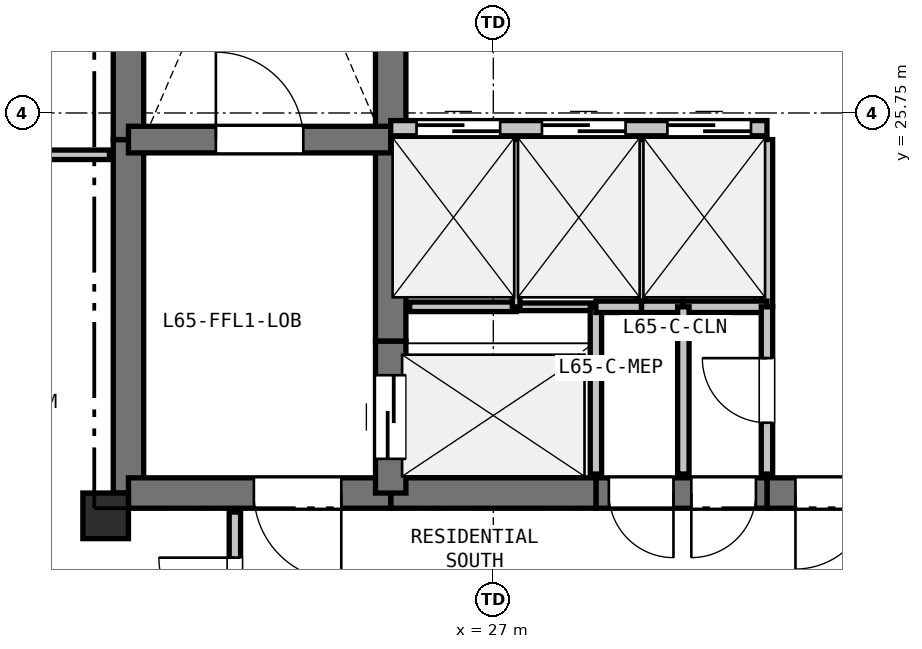
"""IFC4 building model, lengths in metres.
Left out: names, types, materials, properties, quantities, classifications, styles, units other than length and angle.
Written with IfcOpenShell. Run it as: python <this file> out.ifc"""

import sys

from ifc_helpers import new_model, si_unit, direction, frame, frame_2d, origin, origin_2d, place, context, subcontext, project, spatial, rectangle, extrude, element, fill, save


model = new_model("IFC4")
c1 = context("Model", 3, precision=1e-05, world=origin(), true_north=direction((0.0, 1.0)))
c2 = subcontext(c1, "Body", "Model", "MODEL_VIEW")
j1 = project(units=[si_unit("LENGTHUNIT", "METRE"), si_unit("PLANEANGLEUNIT", "RADIAN")], contexts=[c1])
p1 = place(None, origin())
s1 = spatial("IfcSite", under=j1, at=p1, CompositionType="ELEMENT")
p2 = place(p1, origin())
s2 = spatial("IfcBuilding", under=s1, at=p2, CompositionType="ELEMENT")
p3 = place(p2, frame((0.0, 0.0, 233.1)))
s3 = spatial("IfcBuildingStorey", under=s2, at=p3, CompositionType="ELEMENT", Elevation=233.1)
p4 = place(p3, frame((21.9, 20.45, 0.0), z_axis=(0.0, 0.0, 1.0), x_axis=(1.0, 0.0, 0.0)))
e1 = element("IfcColumn", 1, at=p4, inside=s3, PredefinedType="COLUMN", context=c2, shape_type="SweptSolid", body=[
    extrude(rectangle(XDim=0.6, YDim=0.6, at=origin_2d()), origin(), (0.0, 0.0, 1.0), 3.3),
])
p5 = place(p3, frame((22.2, 20.75, 0.0), z_axis=(0.0, 0.0, 1.0), x_axis=(0.0, 1.0, 0.0)))
e2 = element("IfcWall", 2, at=p5, inside=s3, PredefinedType="SHEAR", context=c2, shape_type="SweptSolid", body=[
    extrude(rectangle(XDim=4.65, YDim=0.4, at=frame_2d((2.325, 0.0))), origin(), (0.0, 0.0, 1.0), 3.08),
])
p6 = place(p3, frame((22.2, 25.4, 0.0), z_axis=(0.0, 0.0, 1.0), x_axis=(0.0, 1.0, 0.0)))
e3 = element("IfcWall", 3, at=p6, inside=s3, PredefinedType="SHEAR", context=c2, shape_type="SweptSolid", body=[
    extrude(rectangle(XDim=7.35, YDim=0.4, at=frame_2d((3.675, 0.0))), origin(), (0.0, 0.0, 1.0), 3.08),
])
p7 = place(p3, frame((32.35, 20.75, 0.0), z_axis=(0.0, 0.0, 1.0), x_axis=(-1.0, 0.0, 0.0)))
e4 = element("IfcWall", 4, at=p7, inside=s3, PredefinedType="SHEAR", context=c2, shape_type="SweptSolid", body=[
    extrude(rectangle(XDim=1.75, YDim=0.4, at=frame_2d((0.875, 0.0))), origin(), (0.0, 0.0, 1.0), 3.08),
])
p8 = place(p7, frame((0.375, 0.0, 0.0)))
e5 = element("IfcOpeningElement", 5, at=p8, cuts=e4, PredefinedType="OPENING", context=c2, shape_type="SweptSolid", body=[
    extrude(rectangle(XDim=1.0, YDim=2.15, at=frame_2d((0.5, 1.075))), frame((0.0, 0.21, 0.0), z_axis=(0.0, -1.0, 0.0), x_axis=(1.0, 0.0, 0.0)), (0.0, 0.0, 1.0), 0.42),
])
p9 = place(p3, frame((30.6, 20.75, 0.0), z_axis=(0.0, 0.0, 1.0), x_axis=(-1.0, 0.0, 0.0)))
e6 = element("IfcWall", 6, at=p9, inside=s3, PredefinedType="SHEAR", context=c2, shape_type="SweptSolid", body=[
    extrude(rectangle(XDim=2.25, YDim=0.4, at=frame_2d((1.125, 0.0))), origin(), (0.0, 0.0, 1.0), 3.08),
])
p10 = place(p9, frame((1.23, 0.0, 0.0)))
e7 = element("IfcOpeningElement", 7, at=p10, cuts=e6, PredefinedType="OPENING", context=c2, shape_type="SweptSolid", body=[
    extrude(rectangle(XDim=0.85, YDim=2.1, at=frame_2d((0.425, 1.05))), frame((0.0, 0.21, 0.0), z_axis=(0.0, -1.0, 0.0), x_axis=(1.0, 0.0, 0.0)), (0.0, 0.0, 1.0), 0.42),
])
p11 = place(p9, frame((0.145, 0.0, 0.0)))
e8 = element("IfcOpeningElement", 8, at=p11, cuts=e6, PredefinedType="OPENING", context=c2, shape_type="SweptSolid", body=[
    extrude(rectangle(XDim=0.85, YDim=2.1, at=frame_2d((0.425, 1.05))), frame((0.0, 0.21, 0.0), z_axis=(0.0, -1.0, 0.0), x_axis=(1.0, 0.0, 0.0)), (0.0, 0.0, 1.0), 0.42),
])
p12 = place(p3, frame((28.35, 20.75, 0.0), z_axis=(0.0, 0.0, 1.0), x_axis=(-1.0, 0.0, 0.0)))
e9 = element("IfcWall", 9, at=p12, inside=s3, PredefinedType="SHEAR", context=c2, shape_type="SweptSolid", body=[
    extrude(rectangle(XDim=2.7, YDim=0.4, at=frame_2d((1.35, 0.0))), origin(), (0.0, 0.0, 1.0), 3.08),
])
p13 = place(p3, frame((25.65, 20.75, 0.0), z_axis=(0.0, 0.0, 1.0), x_axis=(-1.0, 0.0, 0.0)))
e10 = element("IfcWall", 10, at=p13, inside=s3, PredefinedType="SHEAR", context=c2, shape_type="SweptSolid", body=[
    extrude(rectangle(XDim=3.45, YDim=0.4, at=frame_2d((1.725, 0.0))), origin(), (0.0, 0.0, 1.0), 3.08),
])
p14 = place(p13, frame((0.65, 0.0, 0.0)))
e11 = element("IfcOpeningElement", 11, at=p14, cuts=e10, PredefinedType="OPENING", context=c2, shape_type="SweptSolid", body=[
    extrude(rectangle(XDim=1.15, YDim=2.15, at=frame_2d((0.575, 1.075))), frame((0.0, 0.21, 0.0), z_axis=(0.0, -1.0, 0.0), x_axis=(1.0, 0.0, 0.0)), (0.0, 0.0, 1.0), 0.42),
])
p15 = place(p3, frame((25.65, 20.75, 0.0), z_axis=(0.0, 0.0, 1.0), x_axis=(0.0, 1.0, 0.0)))
e12 = element("IfcWall", 12, at=p15, inside=s3, PredefinedType="SHEAR", context=c2, shape_type="SweptSolid", body=[
    extrude(rectangle(XDim=2.0, YDim=0.4, at=frame_2d((1.0, 0.0))), origin(), (0.0, 0.0, 1.0), 3.08),
])
p16 = place(p15, frame((0.45, 0.0, 0.0)))
e13 = element("IfcOpeningElement", 13, at=p16, cuts=e12, PredefinedType="OPENING", context=c2, shape_type="SweptSolid", body=[
    extrude(rectangle(XDim=1.1, YDim=2.15, at=frame_2d((0.55, 1.075))), frame((0.0, 0.21, 0.0), z_axis=(0.0, -1.0, 0.0), x_axis=(1.0, 0.0, 0.0)), (0.0, 0.0, 1.0), 0.42),
])
p17 = place(p3, frame((25.65, 22.75, 0.0), z_axis=(0.0, 0.0, 1.0), x_axis=(0.0, 1.0, 0.0)))
e14 = element("IfcWall", 14, at=p17, inside=s3, PredefinedType="SHEAR", context=c2, shape_type="SweptSolid", body=[
    extrude(rectangle(XDim=2.8, YDim=0.4, at=frame_2d((1.4, 0.0))), origin(), (0.0, 0.0, 1.0), 3.08),
])
p18 = place(p3, frame((25.65, 25.55, 0.0), z_axis=(0.0, 0.0, 1.0), x_axis=(0.0, 1.0, 0.0)))
e15 = element("IfcWall", 15, at=p18, inside=s3, PredefinedType="SHEAR", context=c2, shape_type="SweptSolid", body=[
    extrude(rectangle(XDim=2.4, YDim=0.4, at=frame_2d((1.2, 0.0))), origin(), (0.0, 0.0, 1.0), 3.08),
])
p19 = place(p3, frame((22.2, 25.4, 0.0), z_axis=(0.0, 0.0, 1.0), x_axis=(1.0, 0.0, 0.0)))
e16 = element("IfcWall", 16, at=p19, inside=s3, PredefinedType="SHEAR", context=c2, shape_type="SweptSolid", body=[
    extrude(rectangle(XDim=3.45, YDim=0.35, at=frame_2d((1.725, 0.0))), origin(), (0.0, 0.0, 1.0), 3.08),
])
p20 = place(p19, frame((1.15, 0.0, 0.0)))
e17 = element("IfcOpeningElement", 17, at=p20, cuts=e16, PredefinedType="OPENING", context=c2, shape_type="SweptSolid", body=[
    extrude(rectangle(XDim=1.15, YDim=2.15, at=frame_2d((0.575, 1.075))), frame((0.0, 0.185, 0.0), z_axis=(0.0, -1.0, 0.0), x_axis=(1.0, 0.0, 0.0)), (0.0, 0.0, 1.0), 0.37),
])
p21 = place(p3, frame((25.65, 25.55, 0.0), z_axis=(0.0, 0.0, 1.0), x_axis=(1.0, 0.0, 0.0)))
e18 = element("IfcWall", 18, at=p21, inside=s3, PredefinedType="PARTITIONING", context=c2, shape_type="SweptSolid", body=[
    extrude(rectangle(XDim=4.95, YDim=0.2, at=frame_2d((2.475, 0.0))), origin(), (0.0, 0.0, 1.0), 3.08),
])
p22 = place(p21, frame((0.34, 0.0, 0.0)))
e19 = element("IfcOpeningElement", 19, at=p22, cuts=e18, PredefinedType="OPENING", context=c2, shape_type="SweptSolid", body=[
    extrude(rectangle(XDim=1.1, YDim=2.15, at=frame_2d((0.55, 1.075))), frame((0.0, 0.11, 0.0), z_axis=(0.0, -1.0, 0.0), x_axis=(1.0, 0.0, 0.0)), (0.0, 0.0, 1.0), 0.22),
])
p23 = place(p21, frame((1.99, 0.0, 0.0)))
e20 = element("IfcOpeningElement", 20, at=p23, cuts=e18, PredefinedType="OPENING", context=c2, shape_type="SweptSolid", body=[
    extrude(rectangle(XDim=1.1, YDim=2.15, at=frame_2d((0.55, 1.075))), frame((0.0, 0.11, 0.0), z_axis=(0.0, -1.0, 0.0), x_axis=(1.0, 0.0, 0.0)), (0.0, 0.0, 1.0), 0.22),
])
p24 = place(p21, frame((3.64, 0.0, 0.0)))
e21 = element("IfcOpeningElement", 21, at=p24, cuts=e18, PredefinedType="OPENING", context=c2, shape_type="SweptSolid", body=[
    extrude(rectangle(XDim=1.1, YDim=2.15, at=frame_2d((0.55, 1.075))), frame((0.0, 0.11, 0.0), z_axis=(0.0, -1.0, 0.0), x_axis=(1.0, 0.0, 0.0)), (0.0, 0.0, 1.0), 0.22),
])
p25 = place(p3, frame((25.9, 23.2, 0.0), z_axis=(0.0, 0.0, 1.0), x_axis=(1.0, 0.0, 0.0)))
e22 = element("IfcWall", 22, at=p25, inside=s3, PredefinedType="PARTITIONING", context=c2, shape_type="SweptSolid", body=[
    extrude(rectangle(XDim=1.4, YDim=0.125, at=frame_2d((0.7, 0.0))), origin(), (0.0, 0.0, 1.0), 3.08),
])
p26 = place(p3, frame((27.3, 23.2, 0.0), z_axis=(0.0, 0.0, 1.0), x_axis=(1.0, 0.0, 0.0)))
e23 = element("IfcWall", 23, at=p26, inside=s3, PredefinedType="PARTITIONING", context=c2, shape_type="SweptSolid", body=[
    extrude(rectangle(XDim=1.05, YDim=0.1, at=frame_2d((0.525, 0.0))), origin(), (0.0, 0.0, 1.0), 3.08),
])
p27 = place(p3, frame((28.35, 23.2, 0.0), z_axis=(0.0, 0.0, 1.0), x_axis=(0.0, -1.0, 0.0)))
e24 = element("IfcWall", 24, at=p27, inside=s3, PredefinedType="PARTITIONING", context=c2, shape_type="SweptSolid", body=[
    extrude(rectangle(XDim=2.2, YDim=0.15, at=frame_2d((1.1, 0.0))), origin(), (0.0, 0.0, 1.0), 3.08),
])
p28 = place(p3, frame((27.3, 25.4, 0.0), z_axis=(0.0, 0.0, 1.0), x_axis=(0.0, -1.0, 0.0)))
e25 = element("IfcWall", 25, at=p28, inside=s3, PredefinedType="PARTITIONING", context=c2, shape_type="SweptSolid", body=[
    extrude(rectangle(XDim=2.2, YDim=0.1, at=frame_2d((1.1, 0.0))), origin(), (0.0, 0.0, 1.0), 3.08),
])
p29 = place(p3, frame((28.95, 25.4, 0.0), z_axis=(0.0, 0.0, 1.0), x_axis=(0.0, -1.0, 0.0)))
e26 = element("IfcWall", 26, at=p29, inside=s3, PredefinedType="PARTITIONING", context=c2, shape_type="SweptSolid", body=[
    extrude(rectangle(XDim=2.2, YDim=0.125, at=frame_2d((1.1, 0.0))), origin(), (0.0, 0.0, 1.0), 3.08),
])
p30 = place(p3, frame((28.95, 23.2, 0.0), z_axis=(0.0, 0.0, 1.0), x_axis=(-1.0, 0.0, 0.0)))
e27 = element("IfcWall", 27, at=p30, inside=s3, PredefinedType="PARTITIONING", context=c2, shape_type="SweptSolid", body=[
    extrude(rectangle(XDim=0.6, YDim=0.15, at=frame_2d((0.3, 0.0))), origin(), (0.0, 0.0, 1.0), 3.08),
])
p31 = place(p3, frame((30.6, 25.4, 0.0), z_axis=(0.0, 0.0, 1.0), x_axis=(0.0, -1.0, 0.0)))
e28 = element("IfcWall", 28, at=p31, inside=s3, PredefinedType="PARTITIONING", context=c2, shape_type="SweptSolid", body=[
    extrude(rectangle(XDim=2.2, YDim=0.15, at=frame_2d((1.1, 0.0))), origin(), (0.0, 0.0, 1.0), 3.08),
])
p32 = place(p3, frame((30.6, 23.2, 0.0), z_axis=(0.0, 0.0, 1.0), x_axis=(-1.0, 0.0, 0.0)))
e29 = element("IfcWall", 29, at=p32, inside=s3, PredefinedType="PARTITIONING", context=c2, shape_type="SweptSolid", body=[
    extrude(rectangle(XDim=1.1, YDim=0.15, at=frame_2d((0.55, 0.0))), origin(), (0.0, 0.0, 1.0), 3.08),
])
p33 = place(p3, frame((29.5, 23.2, 0.0), z_axis=(0.0, 0.0, 1.0), x_axis=(-1.0, 0.0, 0.0)))
e30 = element("IfcWall", 30, at=p33, inside=s3, PredefinedType="PARTITIONING", context=c2, shape_type="SweptSolid", body=[
    extrude(rectangle(XDim=0.55, YDim=0.15, at=frame_2d((0.275, 0.0))), origin(), (0.0, 0.0, 1.0), 3.08),
])
p34 = place(p3, frame((30.6, 21.0, 0.0), z_axis=(0.0, 0.0, 1.0), x_axis=(0.0, 1.0, 0.0)))
e31 = element("IfcWall", 31, at=p34, inside=s3, PredefinedType="PARTITIONING", context=c2, shape_type="SweptSolid", body=[
    extrude(rectangle(XDim=2.2, YDim=0.15, at=frame_2d((1.1, 0.0))), origin(), (0.0, 0.0, 1.0), 3.08),
])
p35 = place(p34, frame((0.675, 0.0, 0.0)))
e32 = element("IfcOpeningElement", 32, at=p35, cuts=e31, PredefinedType="OPENING", context=c2, shape_type="SweptSolid", body=[
    extrude(rectangle(XDim=0.85, YDim=2.1, at=frame_2d((0.425, 1.05))), frame((0.0, 0.085, 0.0), z_axis=(0.0, -1.0, 0.0), x_axis=(1.0, 0.0, 0.0)), (0.0, 0.0, 1.0), 0.17),
])
p36 = place(p3, frame((23.6, 18.3, 0.0), z_axis=(0.0, 0.0, 1.0), x_axis=(0.0, 1.0, 0.0)))
e33 = element("IfcWall", 33, at=p36, inside=s3, PredefinedType="PARTITIONING", context=c2, shape_type="SweptSolid", body=[
    extrude(rectangle(XDim=2.2, YDim=0.15, at=frame_2d((1.1, 0.0))), origin(), (0.0, 0.0, 1.0), 2.528),
])
p37 = place(p36, frame((0.6, 0.0, 0.0)))
e34 = element("IfcOpeningElement", 34, at=p37, cuts=e33, PredefinedType="OPENING", context=c2, shape_type="SweptSolid", body=[
    extrude(rectangle(XDim=1.0, YDim=2.15, at=frame_2d((0.5, 1.075))), frame((0.0, 0.085, 0.0), z_axis=(0.0, -1.0, 0.0), x_axis=(1.0, 0.0, 0.0)), (0.0, 0.0, 1.0), 0.17),
])
p38 = place(p3, frame((29.5, 23.2, 0.0), z_axis=(0.0, 0.0, 1.0), x_axis=(0.0, -1.0, 0.0)))
e35 = element("IfcWall", 35, at=p38, inside=s3, PredefinedType="PARTITIONING", context=c2, shape_type="SweptSolid", body=[
    extrude(rectangle(XDim=2.2, YDim=0.15, at=frame_2d((1.1, 0.0))), origin(), (0.0, 0.0, 1.0), 3.08),
])
p39 = place(p3, frame((16.8, 25.2, 0.0), z_axis=(0.0, 0.0, 1.0), x_axis=(1.0, 0.0, 0.0)))
e36 = element("IfcWall", 36, at=p39, inside=s3, PredefinedType="PARTITIONING", context=c2, shape_type="SweptSolid", body=[
    extrude(rectangle(XDim=5.15, YDim=0.125, at=frame_2d((2.575, 0.0))), origin(), (0.0, 0.0, 1.0), 2.605),
])
p40 = place(p39, frame((2.125, 0.0, 0.0)))
e37 = element("IfcOpeningElement", 37, at=p40, cuts=e36, PredefinedType="OPENING", context=c2, shape_type="SweptSolid", body=[
    extrude(rectangle(XDim=0.9, YDim=2.1, at=frame_2d((0.45, 1.05))), frame((0.0, 0.073, 0.0), z_axis=(0.0, -1.0, 0.0), x_axis=(1.0, 0.0, 0.0)), (0.0, 0.0, 1.0), 0.145),
])
p41 = place(p22, origin())
e38 = element("IfcDoor", 38, at=p41, inside=s3, OperationType="SLIDING_TO_LEFT", PredefinedType="DOOR", context=c2, shape_type="SweptSolid", body=[
    extrude(rectangle(XDim=1.1, YDim=2.15, at=frame_2d((0.55, 1.075))), frame((0.0, 0.025, 0.0), z_axis=(0.0, -1.0, 0.0), x_axis=(1.0, 0.0, 0.0)), (0.0, 0.0, 1.0), 0.05),
])
fill(e19, e38)
p42 = place(p23, origin())
e39 = element("IfcDoor", 39, at=p42, inside=s3, OperationType="SLIDING_TO_LEFT", PredefinedType="DOOR", context=c2, shape_type="SweptSolid", body=[
    extrude(rectangle(XDim=1.1, YDim=2.15, at=frame_2d((0.55, 1.075))), frame((0.0, 0.025, 0.0), z_axis=(0.0, -1.0, 0.0), x_axis=(1.0, 0.0, 0.0)), (0.0, 0.0, 1.0), 0.05),
])
fill(e20, e39)
p43 = place(p24, origin())
e40 = element("IfcDoor", 40, at=p43, inside=s3, OperationType="SLIDING_TO_LEFT", PredefinedType="DOOR", context=c2, shape_type="SweptSolid", body=[
    extrude(rectangle(XDim=1.1, YDim=2.15, at=frame_2d((0.55, 1.075))), frame((0.0, 0.025, 0.0), z_axis=(0.0, -1.0, 0.0), x_axis=(1.0, 0.0, 0.0)), (0.0, 0.0, 1.0), 0.05),
])
fill(e21, e40)
p44 = place(p8, origin())
e41 = element("IfcDoor", 41, at=p44, inside=s3, OperationType="SINGLE_SWING_RIGHT", PredefinedType="DOOR", context=c2, shape_type="SweptSolid", body=[
    extrude(rectangle(XDim=1.0, YDim=2.15, at=frame_2d((0.5, 1.075))), frame((0.0, 0.025, 0.0), z_axis=(0.0, -1.0, 0.0), x_axis=(1.0, 0.0, 0.0)), (0.0, 0.0, 1.0), 0.05),
])
fill(e5, e41)
p45 = place(p16, origin())
e42 = element("IfcDoor", 42, at=p45, inside=s3, OperationType="SLIDING_TO_LEFT", PredefinedType="DOOR", context=c2, shape_type="SweptSolid", body=[
    extrude(rectangle(XDim=1.1, YDim=2.15, at=frame_2d((0.55, 1.075))), frame((0.0, 0.025, 0.0), z_axis=(0.0, -1.0, 0.0), x_axis=(1.0, 0.0, 0.0)), (0.0, 0.0, 1.0), 0.05),
])
fill(e13, e42)
p46 = place(p20, origin())
e43 = element("IfcDoor", 43, at=p46, inside=s3, OperationType="SINGLE_SWING_LEFT", PredefinedType="DOOR", context=c2, shape_type="SweptSolid", body=[
    extrude(rectangle(XDim=1.15, YDim=2.15, at=frame_2d((0.575, 1.075))), frame((0.0, 0.025, 0.0), z_axis=(0.0, -1.0, 0.0), x_axis=(1.0, 0.0, 0.0)), (0.0, 0.0, 1.0), 0.05),
])
fill(e17, e43)
p47 = place(p14, origin())
e44 = element("IfcDoor", 44, at=p47, inside=s3, OperationType="SINGLE_SWING_LEFT", PredefinedType="DOOR", context=c2, shape_type="SweptSolid", body=[
    extrude(rectangle(XDim=1.15, YDim=2.15, at=frame_2d((0.575, 1.075))), frame((0.0, 0.025, 0.0), z_axis=(0.0, -1.0, 0.0), x_axis=(1.0, 0.0, 0.0)), (0.0, 0.0, 1.0), 0.05),
])
fill(e11, e44)
p48 = place(p35, origin())
e45 = element("IfcDoor", 45, at=p48, inside=s3, OperationType="SINGLE_SWING_RIGHT", PredefinedType="DOOR", context=c2, shape_type="SweptSolid", body=[
    extrude(rectangle(XDim=0.85, YDim=2.1, at=frame_2d((0.425, 1.05))), frame((0.0, 0.025, 0.0), z_axis=(0.0, -1.0, 0.0), x_axis=(1.0, 0.0, 0.0)), (0.0, 0.0, 1.0), 0.05),
])
fill(e32, e45)
p49 = place(p10, origin())
e46 = element("IfcDoor", 46, at=p49, inside=s3, OperationType="SINGLE_SWING_LEFT", PredefinedType="DOOR", context=c2, shape_type="SweptSolid", body=[
    extrude(rectangle(XDim=0.85, YDim=2.1, at=frame_2d((0.425, 1.05))), frame((0.0, 0.025, 0.0), z_axis=(0.0, -1.0, 0.0), x_axis=(1.0, 0.0, 0.0)), (0.0, 0.0, 1.0), 0.05),
])
fill(e7, e46)
p50 = place(p11, origin())
e47 = element("IfcDoor", 47, at=p50, inside=s3, OperationType="SINGLE_SWING_RIGHT", PredefinedType="DOOR", context=c2, shape_type="SweptSolid", body=[
    extrude(rectangle(XDim=0.85, YDim=2.1, at=frame_2d((0.425, 1.05))), frame((0.0, 0.025, 0.0), z_axis=(0.0, -1.0, 0.0), x_axis=(1.0, 0.0, 0.0)), (0.0, 0.0, 1.0), 0.05),
])
fill(e8, e47)
p51 = place(p37, origin())
e48 = element("IfcDoor", 48, at=p51, inside=s3, OperationType="SINGLE_SWING_RIGHT", PredefinedType="DOOR", context=c2, shape_type="SweptSolid", body=[
    extrude(rectangle(XDim=1.0, YDim=2.15, at=frame_2d((0.5, 1.075))), frame((0.0, 0.025, 0.0), z_axis=(0.0, -1.0, 0.0), x_axis=(1.0, 0.0, 0.0)), (0.0, 0.0, 1.0), 0.05),
])
fill(e34, e48)
save(model, sys.argv[1])
